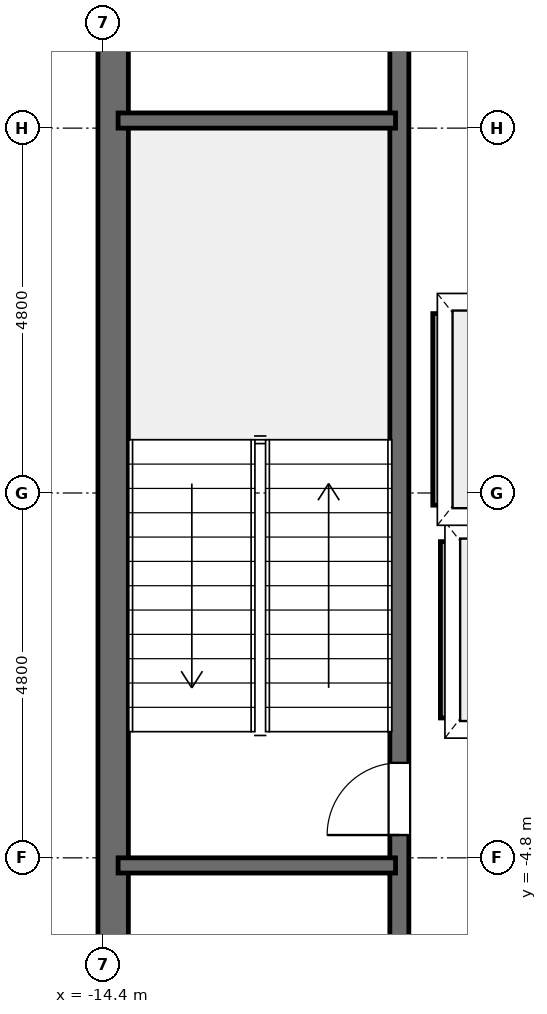
"""IFC4 building model, lengths in metres.
Left out: names, types, materials, properties, quantities, classifications, styles, units other than length and angle.
Written with IfcOpenShell. Run it as: python <this file> out.ifc"""

import sys

from ifc_helpers import new_model, si_unit, direction, frame, frame_2d, origin, place, context, subcontext, project, spatial, rectangle, extrude, element, fill, save


model = new_model("IFC4")
c1 = context("Model", 3, precision=1e-05, world=origin(), true_north=direction((0.0, 1.0)))
c2 = subcontext(c1, "Body", "Model", "MODEL_VIEW")
j1 = project(units=[si_unit("LENGTHUNIT", "METRE"), si_unit("PLANEANGLEUNIT", "RADIAN")], contexts=[c1])
p1 = place(None, origin())
s1 = spatial("IfcSite", under=j1, at=p1, CompositionType="ELEMENT")
p2 = place(p1, origin())
s2 = spatial("IfcBuilding", under=s1, at=p2, CompositionType="ELEMENT")
p3 = place(p2, frame((0.0, 0.0, -10.2)))
s3 = spatial("IfcBuildingStorey", under=s2, at=p3, CompositionType="ELEMENT", Elevation=-10.2)
p4 = place(p3, frame((-14.265, -7.2, -0.25), z_axis=(0.0, 0.0, 1.0), x_axis=(0.0, 1.0, 0.0)))
e1 = element("IfcWall", 1, at=p4, inside=s3, PredefinedType="SHEAR", context=c2, shape_type="SweptSolid", body=[
    extrude(rectangle(XDim=14.4, YDim=0.4, at=frame_2d((7.2, 0.0))), origin(), (0.0, 0.0, 1.0), 4.8),
])
p5 = place(p3, frame((-10.5, -6.82, -0.25), z_axis=(0.0, 0.0, 1.0), x_axis=(0.0, 1.0, 0.0)))
e2 = element("IfcWall", 2, at=p5, inside=s3, PredefinedType="SOLIDWALL", context=c2, shape_type="SweptSolid", body=[
    extrude(rectangle(XDim=13.64, YDim=0.25, at=frame_2d((6.82, 0.0))), origin(), (0.0, 0.0, 1.0), 4.8),
])
p6 = place(p5, frame((2.32, 0.0, 0.25)))
e3 = element("IfcOpeningElement", 3, at=p6, cuts=e2, PredefinedType="OPENING", context=c2, shape_type="SweptSolid", body=[
    extrude(rectangle(XDim=0.95, YDim=2.15, at=frame_2d((0.475, 1.075))), frame((0.0, 0.14, 0.0), z_axis=(0.0, -1.0, 0.0), x_axis=(1.0, 0.0, 0.0)), (0.0, 0.0, 1.0), 0.28),
])
for number, where, z_axis, x_axis in (
    (4, (-14.2, -4.9, -0.25), (0.0, 0.0, 1.0), (1.0, 0.0, 0.0)),
    (5, (-14.2, 4.9, -0.25), (0.0, 0.0, 1.0), (1.0, 0.0, 0.0)),
):
    element("IfcWall", number, at=place(p3, frame(where, z_axis=z_axis, x_axis=x_axis)), inside=s3, PredefinedType="SOLIDWALL", context=c2, shape_type="SweptSolid", body=[
        extrude(rectangle(XDim=3.65, YDim=0.2, at=frame_2d((1.825, 0.0))), origin(), (0.0, 0.0, 1.0), 4.8),
    ])
p7 = place(p3, frame((-9.82, -3.1, 0.0), z_axis=(0.0, 0.0, 1.0), x_axis=(1.0, 0.0, 0.0)))
e6 = element("IfcWall", 6, at=p7, inside=s3, PredefinedType="SOLIDWALL", context=c2, shape_type="SweptSolid", body=[
    extrude(rectangle(XDim=2.04, YDim=0.2, at=frame_2d((1.02, 0.0))), origin(), (0.0, 0.0, 1.0), 4.55),
])
p8 = place(p7, frame((0.47, 0.0, 0.0)))
e7 = element("IfcOpeningElement", 7, at=p8, cuts=e6, PredefinedType="OPENING", context=c2, shape_type="SweptSolid", body=[
    extrude(rectangle(XDim=1.1, YDim=2.2, at=frame_2d((0.55, 1.1))), frame((0.0, 0.115, 0.0), z_axis=(0.0, -1.0, 0.0), x_axis=(1.0, 0.0, 0.0)), (0.0, 0.0, 1.0), 0.23),
])
p9 = place(p3, frame((-9.82, -0.5, 0.0), z_axis=(0.0, 0.0, 1.0), x_axis=(1.0, 0.0, 0.0)))
e8 = element("IfcWall", 8, at=p9, inside=s3, PredefinedType="SOLIDWALL", context=c2, shape_type="SweptSolid", body=[
    extrude(rectangle(XDim=2.04, YDim=0.2, at=frame_2d((1.02, 0.0))), origin(), (0.0, 0.0, 1.0), 4.55),
])
p10 = place(p3, frame((-9.9, -2.96, 0.0), z_axis=(0.0, 0.0, 1.0), x_axis=(0.0, 1.0, 0.0)))
e9 = element("IfcWall", 9, at=p10, inside=s3, PredefinedType="PARTITIONING", context=c2, shape_type="SweptSolid", body=[
    extrude(rectangle(XDim=2.32, YDim=0.12, at=frame_2d((1.16, 0.0))), origin(), (0.0, 0.0, 1.0), 4.55),
])
p11 = place(p3, frame((-9.92, 2.5, 0.0), z_axis=(0.0, 0.0, 1.0), x_axis=(1.0, 0.0, 0.0)))
e10 = element("IfcWall", 10, at=p11, inside=s3, PredefinedType="SOLIDWALL", context=c2, shape_type="SweptSolid", body=[
    extrude(rectangle(XDim=2.24, YDim=0.2, at=frame_2d((1.12, 0.0))), origin(), (0.0, 0.0, 1.0), 4.55),
])
p12 = place(p11, frame((0.495, 0.0, 0.0)))
e11 = element("IfcOpeningElement", 11, at=p12, cuts=e10, PredefinedType="OPENING", context=c2, shape_type="SweptSolid", body=[
    extrude(rectangle(XDim=1.25, YDim=2.25, at=frame_2d((0.625, 1.125))), frame((0.0, 0.115, 0.0), z_axis=(0.0, -1.0, 0.0), x_axis=(1.0, 0.0, 0.0)), (0.0, 0.0, 1.0), 0.23),
])
p13 = place(p3, frame((-9.92, -0.3, 0.0), z_axis=(0.0, 0.0, 1.0), x_axis=(1.0, 0.0, 0.0)))
e12 = element("IfcWall", 12, at=p13, inside=s3, PredefinedType="SOLIDWALL", context=c2, shape_type="SweptSolid", body=[
    extrude(rectangle(XDim=2.24, YDim=0.2, at=frame_2d((1.12, 0.0))), origin(), (0.0, 0.0, 1.0), 4.55),
])
p14 = place(p3, frame((-10.0, -0.16, 0.0), z_axis=(0.0, 0.0, 1.0), x_axis=(0.0, 1.0, 0.0)))
e13 = element("IfcWall", 13, at=p14, inside=s3, PredefinedType="PARTITIONING", context=c2, shape_type="SweptSolid", body=[
    extrude(rectangle(XDim=2.52, YDim=0.12, at=frame_2d((1.26, 0.0))), origin(), (0.0, 0.0, 1.0), 4.55),
])
p15 = place(p6, origin())
e14 = element("IfcDoor", 14, at=p15, inside=s3, OperationType="SINGLE_SWING_RIGHT", PredefinedType="DOOR", context=c2, shape_type="SweptSolid", body=[
    extrude(rectangle(XDim=0.95, YDim=2.15, at=frame_2d((0.475, 1.075))), frame((0.0, 0.025, 0.0), z_axis=(0.0, -1.0, 0.0), x_axis=(1.0, 0.0, 0.0)), (0.0, 0.0, 1.0), 0.05),
])
fill(e3, e14)
save(model, sys.argv[1])
